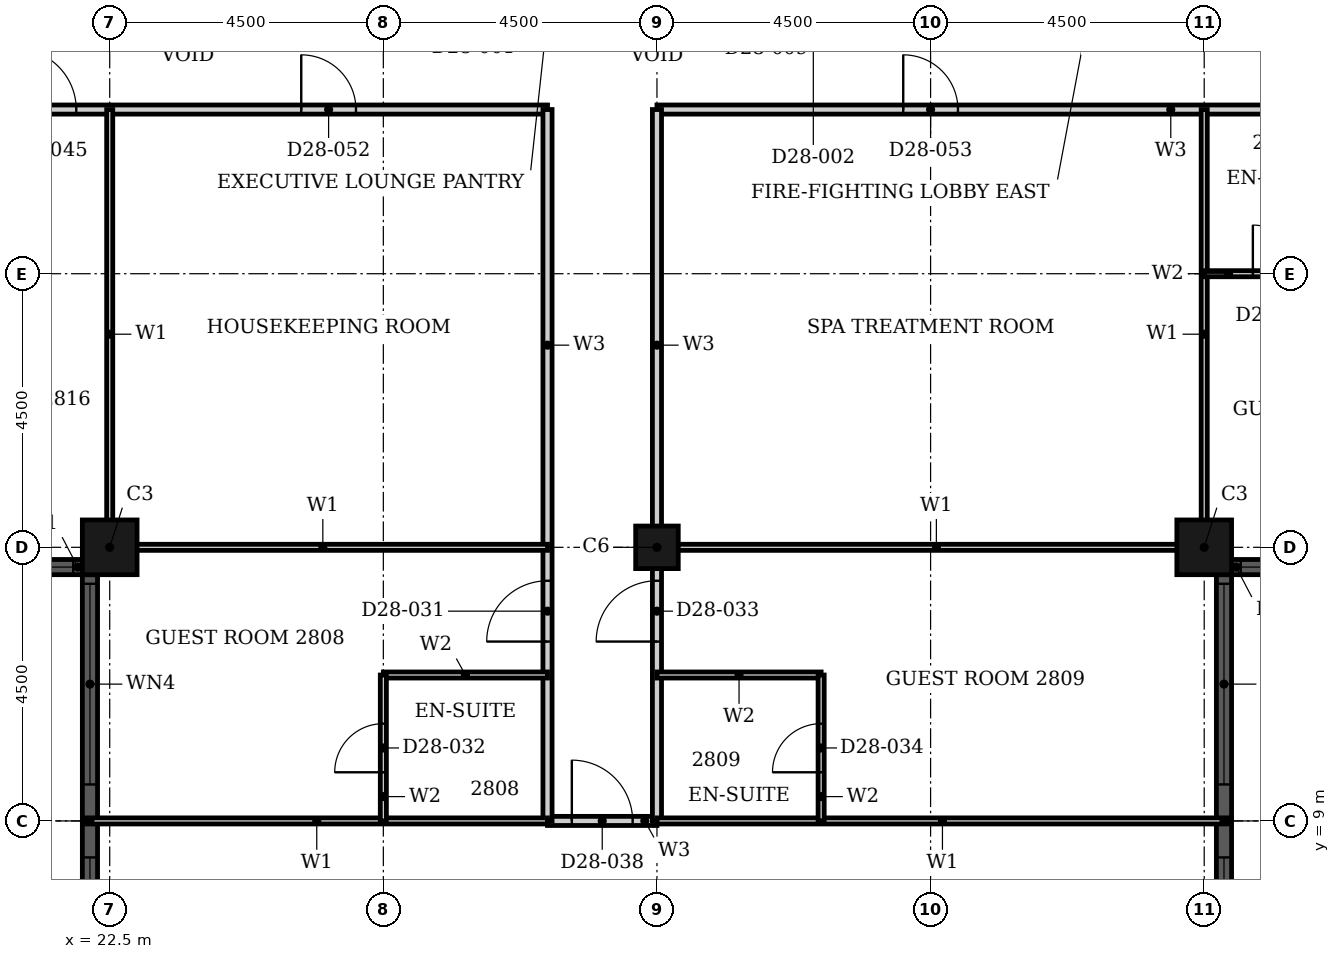
"""IFC4 building model, lengths in metres.
Left out: names, types, materials, properties, quantities, classifications, styles, units other than length and angle.
Written with IfcOpenShell. Run it as: python <this file> out.ifc"""

import sys

from ifc_helpers import new_model, si_unit, direction, frame, frame_2d, origin, origin_2d, place, context, subcontext, project, spatial, rectangle, hollow_rectangle, extrude, element, fill, save


model = new_model("IFC4")
c1 = context("Model", 3, precision=1e-05, world=origin(), true_north=direction((0.0, 1.0)))
c2 = subcontext(c1, "Body", "Model", "MODEL_VIEW")
j1 = project(units=[si_unit("LENGTHUNIT", "METRE"), si_unit("PLANEANGLEUNIT", "RADIAN")], contexts=[c1])
p1 = place(None, origin())
s1 = spatial("IfcSite", under=j1, at=p1, CompositionType="ELEMENT")
p2 = place(p1, origin())
s2 = spatial("IfcBuilding", under=s1, at=p2, CompositionType="ELEMENT")
p3 = place(p2, frame((0.0, 0.0, 115.2)))
s3 = spatial("IfcBuildingStorey", under=s2, at=p3, CompositionType="ELEMENT", Elevation=115.2)
for number, where, z_axis, x_axis in (
    (1, (40.5, 13.5, 0.0), (0.0, 0.0, 1.0), (1.0, 0.0, 0.0)),
    (2, (22.5, 13.5, 0.0), (0.0, 0.0, 1.0), (1.0, 0.0, 0.0)),
):
    element("IfcColumn", number, at=place(p3, frame(where, z_axis=z_axis, x_axis=x_axis)), inside=s3, PredefinedType="COLUMN", context=c2, shape_type="SweptSolid", body=[
        extrude(hollow_rectangle(XDim=0.9, YDim=0.9, WallThickness=0.028, at=origin_2d()), origin(), (0.0, 0.0, 1.0), 3.6),
    ])
p4 = place(p3, frame((31.5, 13.5, 0.0), z_axis=(0.0, 0.0, 1.0), x_axis=(1.0, 0.0, 0.0)))
e3 = element("IfcColumn", 3, at=p4, inside=s3, PredefinedType="COLUMN", context=c2, shape_type="SweptSolid", body=[
    extrude(hollow_rectangle(XDim=0.7, YDim=0.7, WallThickness=0.022, at=origin_2d()), origin(), (0.0, 0.0, 1.0), 3.6),
])
p5 = place(p3, frame((40.825, 4.95, 0.0), z_axis=(0.0, 0.0, 1.0), x_axis=(0.0, 1.0, 0.0)))
e4 = element("IfcWall", 4, at=p5, inside=s3, PredefinedType="SOLIDWALL", context=c2, shape_type="SweptSolid", body=[
    extrude(rectangle(XDim=8.1, YDim=0.25, at=frame_2d((4.05, 0.0))), origin(), (0.0, 0.0, 1.0), 3.6),
])
p6 = place(p5, frame((0.15, 0.0, 0.9)))
e5 = element("IfcOpeningElement", 5, at=p6, cuts=e4, PredefinedType="OPENING", context=c2, shape_type="SweptSolid", body=[
    extrude(rectangle(XDim=3.3, YDim=2.08, at=frame_2d((1.65, 1.04))), frame((0.0, 0.135, 0.0), z_axis=(0.0, -1.0, 0.0), x_axis=(1.0, 0.0, 0.0)), (0.0, 0.0, 1.0), 0.27),
])
p7 = place(p5, frame((4.65, 0.0, 0.9)))
e6 = element("IfcOpeningElement", 6, at=p7, cuts=e4, PredefinedType="OPENING", context=c2, shape_type="SweptSolid", body=[
    extrude(rectangle(XDim=3.3, YDim=2.08, at=frame_2d((1.65, 1.04))), frame((0.0, 0.135, 0.0), z_axis=(0.0, -1.0, 0.0), x_axis=(1.0, 0.0, 0.0)), (0.0, 0.0, 1.0), 0.27),
])
p8 = place(p3, frame((40.95, 13.175, 0.0), z_axis=(0.0, 0.0, 1.0), x_axis=(1.0, 0.0, 0.0)))
e7 = element("IfcWall", 7, at=p8, inside=s3, PredefinedType="SOLIDWALL", context=c2, shape_type="SweptSolid", body=[
    extrude(rectangle(XDim=3.6, YDim=0.25, at=frame_2d((1.8, 0.0))), origin(), (0.0, 0.0, 1.0), 3.6),
])
p9 = place(p8, frame((0.15, 0.0, 0.9)))
e8 = element("IfcOpeningElement", 8, at=p9, cuts=e7, PredefinedType="OPENING", context=c2, shape_type="SweptSolid", body=[
    extrude(rectangle(XDim=3.3, YDim=2.08, at=frame_2d((1.65, 1.04))), frame((0.0, 0.135, 0.0), z_axis=(0.0, -1.0, 0.0), x_axis=(1.0, 0.0, 0.0)), (0.0, 0.0, 1.0), 0.27),
])
p10 = place(p3, frame((18.45, 13.175, 0.0), z_axis=(0.0, 0.0, 1.0), x_axis=(1.0, 0.0, 0.0)))
e9 = element("IfcWall", 9, at=p10, inside=s3, PredefinedType="SOLIDWALL", context=c2, shape_type="SweptSolid", body=[
    extrude(rectangle(XDim=3.6, YDim=0.25, at=frame_2d((1.8, 0.0))), origin(), (0.0, 0.0, 1.0), 3.6),
])
p11 = place(p10, frame((0.15, 0.0, 0.9)))
e10 = element("IfcOpeningElement", 10, at=p11, cuts=e9, PredefinedType="OPENING", context=c2, shape_type="SweptSolid", body=[
    extrude(rectangle(XDim=3.3, YDim=2.08, at=frame_2d((1.65, 1.04))), frame((0.0, 0.135, 0.0), z_axis=(0.0, -1.0, 0.0), x_axis=(1.0, 0.0, 0.0)), (0.0, 0.0, 1.0), 0.27),
])
p12 = place(p3, frame((22.175, 13.05, 0.0), z_axis=(0.0, 0.0, 1.0), x_axis=(0.0, -1.0, 0.0)))
e11 = element("IfcWall", 11, at=p12, inside=s3, PredefinedType="SOLIDWALL", context=c2, shape_type="SweptSolid", body=[
    extrude(rectangle(XDim=8.1, YDim=0.25, at=frame_2d((4.05, 0.0))), origin(), (0.0, 0.0, 1.0), 3.6),
])
p13 = place(p12, frame((0.15, 0.0, 0.9)))
e12 = element("IfcOpeningElement", 12, at=p13, cuts=e11, PredefinedType="OPENING", context=c2, shape_type="SweptSolid", body=[
    extrude(rectangle(XDim=3.3, YDim=2.08, at=frame_2d((1.65, 1.04))), frame((0.0, 0.135, 0.0), z_axis=(0.0, -1.0, 0.0), x_axis=(1.0, 0.0, 0.0)), (0.0, 0.0, 1.0), 0.27),
])
p14 = place(p12, frame((4.65, 0.0, 0.9)))
e13 = element("IfcOpeningElement", 13, at=p14, cuts=e11, PredefinedType="OPENING", context=c2, shape_type="SweptSolid", body=[
    extrude(rectangle(XDim=3.3, YDim=2.08, at=frame_2d((1.65, 1.04))), frame((0.0, 0.135, 0.0), z_axis=(0.0, -1.0, 0.0), x_axis=(1.0, 0.0, 0.0)), (0.0, 0.0, 1.0), 0.27),
])
p15 = place(p3, frame((16.2, 20.7, 0.0), z_axis=(0.0, 0.0, 1.0), x_axis=(1.0, 0.0, 0.0)))
e14 = element("IfcWall", 14, at=p15, inside=s3, PredefinedType="PARTITIONING", context=c2, shape_type="SweptSolid", body=[
    extrude(rectangle(XDim=13.5, YDim=0.15, at=frame_2d((6.75, 0.0))), origin(), (0.0, 0.0, 1.0), 3.3),
])
p16 = place(p15, frame((4.75, 0.0, 0.0)))
e15 = element("IfcOpeningElement", 15, at=p16, cuts=e14, PredefinedType="OPENING", context=c2, shape_type="SweptSolid", body=[
    extrude(rectangle(XDim=1.0, YDim=2.1, at=frame_2d((0.5, 1.05))), frame((0.0, 0.085, 0.0), z_axis=(0.0, -1.0, 0.0), x_axis=(1.0, 0.0, 0.0)), (0.0, 0.0, 1.0), 0.17),
])
p17 = place(p15, frame((9.45, 0.0, 0.0)))
e16 = element("IfcOpeningElement", 16, at=p17, cuts=e14, PredefinedType="OPENING", context=c2, shape_type="SweptSolid", body=[
    extrude(rectangle(XDim=0.9, YDim=2.1, at=frame_2d((0.45, 1.05))), frame((0.0, 0.085, 0.0), z_axis=(0.0, -1.0, 0.0), x_axis=(1.0, 0.0, 0.0)), (0.0, 0.0, 1.0), 0.17),
])
p18 = place(p3, frame((31.5, 20.7, 0.0), z_axis=(0.0, 0.0, 1.0), x_axis=(1.0, 0.0, 0.0)))
e17 = element("IfcWall", 17, at=p18, inside=s3, PredefinedType="PARTITIONING", context=c2, shape_type="SweptSolid", body=[
    extrude(rectangle(XDim=15.3, YDim=0.15, at=frame_2d((7.65, 0.0))), origin(), (0.0, 0.0, 1.0), 3.3),
])
p19 = place(p18, frame((11.95, 0.0, 0.0)))
e18 = element("IfcOpeningElement", 18, at=p19, cuts=e17, PredefinedType="OPENING", context=c2, shape_type="SweptSolid", body=[
    extrude(rectangle(XDim=1.0, YDim=2.1, at=frame_2d((0.5, 1.05))), frame((0.0, 0.085, 0.0), z_axis=(0.0, -1.0, 0.0), x_axis=(1.0, 0.0, 0.0)), (0.0, 0.0, 1.0), 0.17),
])
p20 = place(p18, frame((13.95, 0.0, 0.0)))
e19 = element("IfcOpeningElement", 19, at=p20, cuts=e17, PredefinedType="OPENING", context=c2, shape_type="SweptSolid", body=[
    extrude(rectangle(XDim=0.9, YDim=2.1, at=frame_2d((0.45, 1.05))), frame((0.0, 0.085, 0.0), z_axis=(0.0, -1.0, 0.0), x_axis=(1.0, 0.0, 0.0)), (0.0, 0.0, 1.0), 0.17),
])
p21 = place(p18, frame((4.05, 0.0, 0.0)))
e20 = element("IfcOpeningElement", 20, at=p21, cuts=e17, PredefinedType="OPENING", context=c2, shape_type="SweptSolid", body=[
    extrude(rectangle(XDim=0.9, YDim=2.1, at=frame_2d((0.45, 1.05))), frame((0.0, 0.085, 0.0), z_axis=(0.0, -1.0, 0.0), x_axis=(1.0, 0.0, 0.0)), (0.0, 0.0, 1.0), 0.17),
])
p22 = place(p3, frame((29.7, 9.0, 0.0), z_axis=(0.0, 0.0, 1.0), x_axis=(1.0, 0.0, 0.0)))
e21 = element("IfcWall", 21, at=p22, inside=s3, PredefinedType="PARTITIONING", context=c2, shape_type="SweptSolid", body=[
    extrude(rectangle(XDim=1.8, YDim=0.15, at=frame_2d((0.9, 0.0))), origin(), (0.0, 0.0, 1.0), 3.3),
])
p23 = place(p22, frame((0.4, 0.0, 0.0)))
e22 = element("IfcOpeningElement", 22, at=p23, cuts=e21, PredefinedType="OPENING", context=c2, shape_type="SweptSolid", body=[
    extrude(rectangle(XDim=1.0, YDim=2.1, at=frame_2d((0.5, 1.05))), frame((0.0, 0.085, 0.0), z_axis=(0.0, -1.0, 0.0), x_axis=(1.0, 0.0, 0.0)), (0.0, 0.0, 1.0), 0.17),
])
p24 = place(p3, frame((29.7, 9.0, 0.0), z_axis=(0.0, 0.0, 1.0), x_axis=(0.0, 1.0, 0.0)))
e23 = element("IfcWall", 23, at=p24, inside=s3, PredefinedType="PARTITIONING", context=c2, shape_type="SweptSolid", body=[
    extrude(rectangle(XDim=11.7, YDim=0.15, at=frame_2d((5.85, 0.0))), origin(), (0.0, 0.0, 1.0), 3.3),
])
p25 = place(p24, frame((2.95, 0.0, 0.0)))
e24 = element("IfcOpeningElement", 24, at=p25, cuts=e23, PredefinedType="OPENING", context=c2, shape_type="SweptSolid", body=[
    extrude(rectangle(XDim=1.0, YDim=2.1, at=frame_2d((0.5, 1.05))), frame((0.0, 0.085, 0.0), z_axis=(0.0, -1.0, 0.0), x_axis=(1.0, 0.0, 0.0)), (0.0, 0.0, 1.0), 0.17),
])
p26 = place(p3, frame((31.5, 9.0, 0.0), z_axis=(0.0, 0.0, 1.0), x_axis=(0.0, 1.0, 0.0)))
e25 = element("IfcWall", 25, at=p26, inside=s3, PredefinedType="PARTITIONING", context=c2, shape_type="SweptSolid", body=[
    extrude(rectangle(XDim=11.7, YDim=0.15, at=frame_2d((5.85, 0.0))), origin(), (0.0, 0.0, 1.0), 2.58),
])
p27 = place(p26, frame((2.95, 0.0, 0.0)))
e26 = element("IfcOpeningElement", 26, at=p27, cuts=e25, PredefinedType="OPENING", context=c2, shape_type="SweptSolid", body=[
    extrude(rectangle(XDim=1.0, YDim=2.1, at=frame_2d((0.5, 1.05))), frame((0.0, 0.085, 0.0), z_axis=(0.0, -1.0, 0.0), x_axis=(1.0, 0.0, 0.0)), (0.0, 0.0, 1.0), 0.17),
])
p28 = place(p3, frame((31.5, 13.5, 0.0), z_axis=(0.0, 0.0, 1.0), x_axis=(1.0, 0.0, 0.0)))
e27 = element("IfcWall", 27, at=p28, inside=s3, PredefinedType="PARTITIONING", context=c2, shape_type="SweptSolid", body=[
    extrude(rectangle(XDim=9.19, YDim=0.1, at=frame_2d((4.595, 0.0))), origin(), (0.0, 0.0, 1.0), 2.38),
])
p29 = place(p3, frame((22.31, 13.5, 0.0), z_axis=(0.0, 0.0, 1.0), x_axis=(1.0, 0.0, 0.0)))
e28 = element("IfcWall", 28, at=p29, inside=s3, PredefinedType="PARTITIONING", context=c2, shape_type="SweptSolid", body=[
    extrude(rectangle(XDim=7.39, YDim=0.1, at=frame_2d((3.695, 0.0))), origin(), (0.0, 0.0, 1.0), 2.38),
])
p30 = place(p3, frame((31.5, 9.0, 0.0), z_axis=(0.0, 0.0, 1.0), x_axis=(1.0, 0.0, 0.0)))
e29 = element("IfcWall", 29, at=p30, inside=s3, PredefinedType="PARTITIONING", context=c2, shape_type="SweptSolid", body=[
    extrude(rectangle(XDim=9.39, YDim=0.1, at=frame_2d((4.695, 0.0))), origin(), (0.0, 0.0, 1.0), 3.3),
])
p31 = place(p3, frame((22.11, 9.0, 0.0), z_axis=(0.0, 0.0, 1.0), x_axis=(1.0, 0.0, 0.0)))
e30 = element("IfcWall", 30, at=p31, inside=s3, PredefinedType="PARTITIONING", context=c2, shape_type="SweptSolid", body=[
    extrude(rectangle(XDim=7.59, YDim=0.1, at=frame_2d((3.795, 0.0))), origin(), (0.0, 0.0, 1.0), 3.3),
])
for number, where, z_axis, x_axis in (
    (31, (22.5, 13.31, 0.0), (0.0, 0.0, 1.0), (0.0, 1.0, 0.0)),
    (32, (40.5, 13.31, 0.0), (0.0, 0.0, 1.0), (0.0, 1.0, 0.0)),
):
    element("IfcWall", number, at=place(p3, frame(where, z_axis=z_axis, x_axis=x_axis)), inside=s3, PredefinedType="PARTITIONING", context=c2, shape_type="SweptSolid", body=[
        extrude(rectangle(XDim=7.39, YDim=0.1, at=frame_2d((3.695, 0.0))), origin(), (0.0, 0.0, 1.0), 3.3),
    ])
for number, where, z_axis, x_axis in (
    (33, (31.5, 11.4, 0.0), (0.0, 0.0, 1.0), (1.0, 0.0, 0.0)),
    (34, (27.0, 11.4, 0.0), (0.0, 0.0, 1.0), (1.0, 0.0, 0.0)),
):
    element("IfcWall", number, at=place(p3, frame(where, z_axis=z_axis, x_axis=x_axis)), inside=s3, PredefinedType="PARTITIONING", context=c2, shape_type="SweptSolid", body=[
        extrude(rectangle(XDim=2.7, YDim=0.1, at=frame_2d((1.35, 0.0))), origin(), (0.0, 0.0, 1.0), 3.3),
    ])
p32 = place(p3, frame((40.5, 18.0, 0.0), z_axis=(0.0, 0.0, 1.0), x_axis=(1.0, 0.0, 0.0)))
e35 = element("IfcWall", 35, at=p32, inside=s3, PredefinedType="PARTITIONING", context=c2, shape_type="SweptSolid", body=[
    extrude(rectangle(XDim=2.4, YDim=0.1, at=frame_2d((1.2, 0.0))), origin(), (0.0, 0.0, 1.0), 3.3),
])
p33 = place(p32, frame((0.8, 0.0, 0.0)))
e36 = element("IfcOpeningElement", 36, at=p33, cuts=e35, PredefinedType="OPENING", context=c2, shape_type="SweptSolid", body=[
    extrude(rectangle(XDim=0.8, YDim=2.1, at=frame_2d((0.4, 1.05))), frame((0.0, 0.06, 0.0), z_axis=(0.0, -1.0, 0.0), x_axis=(1.0, 0.0, 0.0)), (0.0, 0.0, 1.0), 0.12),
])
p34 = place(p3, frame((27.0, 9.0, 0.0), z_axis=(0.0, 0.0, 1.0), x_axis=(0.0, 1.0, 0.0)))
e37 = element("IfcWall", 37, at=p34, inside=s3, PredefinedType="PARTITIONING", context=c2, shape_type="SweptSolid", body=[
    extrude(rectangle(XDim=2.4, YDim=0.1, at=frame_2d((1.2, 0.0))), origin(), (0.0, 0.0, 1.0), 2.58),
])
p35 = place(p34, frame((0.8, 0.0, 0.0)))
e38 = element("IfcOpeningElement", 38, at=p35, cuts=e37, PredefinedType="OPENING", context=c2, shape_type="SweptSolid", body=[
    extrude(rectangle(XDim=0.8, YDim=2.1, at=frame_2d((0.4, 1.05))), frame((0.0, 0.06, 0.0), z_axis=(0.0, -1.0, 0.0), x_axis=(1.0, 0.0, 0.0)), (0.0, 0.0, 1.0), 0.12),
])
p36 = place(p3, frame((34.2, 9.0, 0.0), z_axis=(0.0, 0.0, 1.0), x_axis=(0.0, 1.0, 0.0)))
e39 = element("IfcWall", 39, at=p36, inside=s3, PredefinedType="PARTITIONING", context=c2, shape_type="SweptSolid", body=[
    extrude(rectangle(XDim=2.4, YDim=0.1, at=frame_2d((1.2, 0.0))), origin(), (0.0, 0.0, 1.0), 3.3),
])
p37 = place(p36, frame((0.8, 0.0, 0.0)))
e40 = element("IfcOpeningElement", 40, at=p37, cuts=e39, PredefinedType="OPENING", context=c2, shape_type="SweptSolid", body=[
    extrude(rectangle(XDim=0.8, YDim=2.1, at=frame_2d((0.4, 1.05))), frame((0.0, 0.06, 0.0), z_axis=(0.0, -1.0, 0.0), x_axis=(1.0, 0.0, 0.0)), (0.0, 0.0, 1.0), 0.12),
])
p38 = place(p6, origin())
e41 = element("IfcWindow", 41, at=p38, inside=s3, PartitioningType="SINGLE_PANEL", PredefinedType="WINDOW", context=c2, shape_type="SweptSolid", body=[
    extrude(rectangle(XDim=3.3, YDim=2.08, at=frame_2d((1.65, 1.04))), frame((0.0, 0.03, 0.0), z_axis=(0.0, -1.0, 0.0), x_axis=(1.0, 0.0, 0.0)), (0.0, 0.0, 1.0), 0.06),
])
fill(e5, e41)
p39 = place(p7, origin())
e42 = element("IfcWindow", 42, at=p39, inside=s3, PartitioningType="SINGLE_PANEL", PredefinedType="WINDOW", context=c2, shape_type="SweptSolid", body=[
    extrude(rectangle(XDim=3.3, YDim=2.08, at=frame_2d((1.65, 1.04))), frame((0.0, 0.03, 0.0), z_axis=(0.0, -1.0, 0.0), x_axis=(1.0, 0.0, 0.0)), (0.0, 0.0, 1.0), 0.06),
])
fill(e6, e42)
p40 = place(p9, origin())
e43 = element("IfcWindow", 43, at=p40, inside=s3, PartitioningType="SINGLE_PANEL", PredefinedType="WINDOW", context=c2, shape_type="SweptSolid", body=[
    extrude(rectangle(XDim=3.3, YDim=2.08, at=frame_2d((1.65, 1.04))), frame((0.0, 0.03, 0.0), z_axis=(0.0, -1.0, 0.0), x_axis=(1.0, 0.0, 0.0)), (0.0, 0.0, 1.0), 0.06),
])
fill(e8, e43)
p41 = place(p11, origin())
e44 = element("IfcWindow", 44, at=p41, inside=s3, PartitioningType="SINGLE_PANEL", PredefinedType="WINDOW", context=c2, shape_type="SweptSolid", body=[
    extrude(rectangle(XDim=3.3, YDim=2.08, at=frame_2d((1.65, 1.04))), frame((0.0, 0.03, 0.0), z_axis=(0.0, -1.0, 0.0), x_axis=(1.0, 0.0, 0.0)), (0.0, 0.0, 1.0), 0.06),
])
fill(e10, e44)
p42 = place(p13, origin())
e45 = element("IfcWindow", 45, at=p42, inside=s3, PartitioningType="SINGLE_PANEL", PredefinedType="WINDOW", context=c2, shape_type="SweptSolid", body=[
    extrude(rectangle(XDim=3.3, YDim=2.08, at=frame_2d((1.65, 1.04))), frame((0.0, 0.03, 0.0), z_axis=(0.0, -1.0, 0.0), x_axis=(1.0, 0.0, 0.0)), (0.0, 0.0, 1.0), 0.06),
])
fill(e12, e45)
p43 = place(p14, origin())
e46 = element("IfcWindow", 46, at=p43, inside=s3, PartitioningType="SINGLE_PANEL", PredefinedType="WINDOW", context=c2, shape_type="SweptSolid", body=[
    extrude(rectangle(XDim=3.3, YDim=2.08, at=frame_2d((1.65, 1.04))), frame((0.0, 0.03, 0.0), z_axis=(0.0, -1.0, 0.0), x_axis=(1.0, 0.0, 0.0)), (0.0, 0.0, 1.0), 0.06),
])
fill(e13, e46)
p44 = place(p25, origin())
e47 = element("IfcDoor", 47, at=p44, inside=s3, OperationType="SINGLE_SWING_RIGHT", PredefinedType="DOOR", context=c2, shape_type="SweptSolid", body=[
    extrude(rectangle(XDim=1.0, YDim=2.1, at=frame_2d((0.5, 1.05))), frame((0.0, 0.025, 0.0), z_axis=(0.0, -1.0, 0.0), x_axis=(1.0, 0.0, 0.0)), (0.0, 0.0, 1.0), 0.05),
])
fill(e24, e47)
p45 = place(p35, origin())
e48 = element("IfcDoor", 48, at=p45, inside=s3, OperationType="SINGLE_SWING_LEFT", PredefinedType="DOOR", context=c2, shape_type="SweptSolid", body=[
    extrude(rectangle(XDim=0.8, YDim=2.1, at=frame_2d((0.4, 1.05))), frame((0.0, 0.025, 0.0), z_axis=(0.0, -1.0, 0.0), x_axis=(1.0, 0.0, 0.0)), (0.0, 0.0, 1.0), 0.05),
])
fill(e38, e48)
p46 = place(p27, origin())
e49 = element("IfcDoor", 49, at=p46, inside=s3, OperationType="SINGLE_SWING_RIGHT", PredefinedType="DOOR", context=c2, shape_type="SweptSolid", body=[
    extrude(rectangle(XDim=1.0, YDim=2.1, at=frame_2d((0.5, 1.05))), frame((0.0, 0.025, 0.0), z_axis=(0.0, -1.0, 0.0), x_axis=(1.0, 0.0, 0.0)), (0.0, 0.0, 1.0), 0.05),
])
fill(e26, e49)
p47 = place(p37, origin())
e50 = element("IfcDoor", 50, at=p47, inside=s3, OperationType="SINGLE_SWING_LEFT", PredefinedType="DOOR", context=c2, shape_type="SweptSolid", body=[
    extrude(rectangle(XDim=0.8, YDim=2.1, at=frame_2d((0.4, 1.05))), frame((0.0, 0.025, 0.0), z_axis=(0.0, -1.0, 0.0), x_axis=(1.0, 0.0, 0.0)), (0.0, 0.0, 1.0), 0.05),
])
fill(e40, e50)
p48 = place(p23, origin())
e51 = element("IfcDoor", 51, at=p48, inside=s3, OperationType="SINGLE_SWING_LEFT", PredefinedType="DOOR", context=c2, shape_type="SweptSolid", body=[
    extrude(rectangle(XDim=1.0, YDim=2.1, at=frame_2d((0.5, 1.05))), frame((0.0, 0.025, 0.0), z_axis=(0.0, -1.0, 0.0), x_axis=(1.0, 0.0, 0.0)), (0.0, 0.0, 1.0), 0.05),
])
fill(e22, e51)
p49 = place(p16, origin())
e52 = element("IfcDoor", 52, at=p49, inside=s3, OperationType="SINGLE_SWING_RIGHT", PredefinedType="DOOR", context=c2, shape_type="SweptSolid", body=[
    extrude(rectangle(XDim=1.0, YDim=2.1, at=frame_2d((0.5, 1.05))), frame((0.0, 0.025, 0.0), z_axis=(0.0, -1.0, 0.0), x_axis=(1.0, 0.0, 0.0)), (0.0, 0.0, 1.0), 0.05),
])
fill(e15, e52)
p50 = place(p33, origin())
e53 = element("IfcDoor", 53, at=p50, inside=s3, OperationType="SINGLE_SWING_RIGHT", PredefinedType="DOOR", context=c2, shape_type="SweptSolid", body=[
    extrude(rectangle(XDim=0.8, YDim=2.1, at=frame_2d((0.4, 1.05))), frame((0.0, 0.025, 0.0), z_axis=(0.0, -1.0, 0.0), x_axis=(1.0, 0.0, 0.0)), (0.0, 0.0, 1.0), 0.05),
])
fill(e36, e53)
p51 = place(p17, origin())
e54 = element("IfcDoor", 54, at=p51, inside=s3, OperationType="SINGLE_SWING_LEFT", PredefinedType="DOOR", context=c2, shape_type="SweptSolid", body=[
    extrude(rectangle(XDim=0.9, YDim=2.1, at=frame_2d((0.45, 1.05))), frame((0.0, 0.025, 0.0), z_axis=(0.0, -1.0, 0.0), x_axis=(1.0, 0.0, 0.0)), (0.0, 0.0, 1.0), 0.05),
])
fill(e16, e54)
p52 = place(p21, origin())
e55 = element("IfcDoor", 55, at=p52, inside=s3, OperationType="SINGLE_SWING_LEFT", PredefinedType="DOOR", context=c2, shape_type="SweptSolid", body=[
    extrude(rectangle(XDim=0.9, YDim=2.1, at=frame_2d((0.45, 1.05))), frame((0.0, 0.025, 0.0), z_axis=(0.0, -1.0, 0.0), x_axis=(1.0, 0.0, 0.0)), (0.0, 0.0, 1.0), 0.05),
])
fill(e20, e55)
save(model, sys.argv[1])
